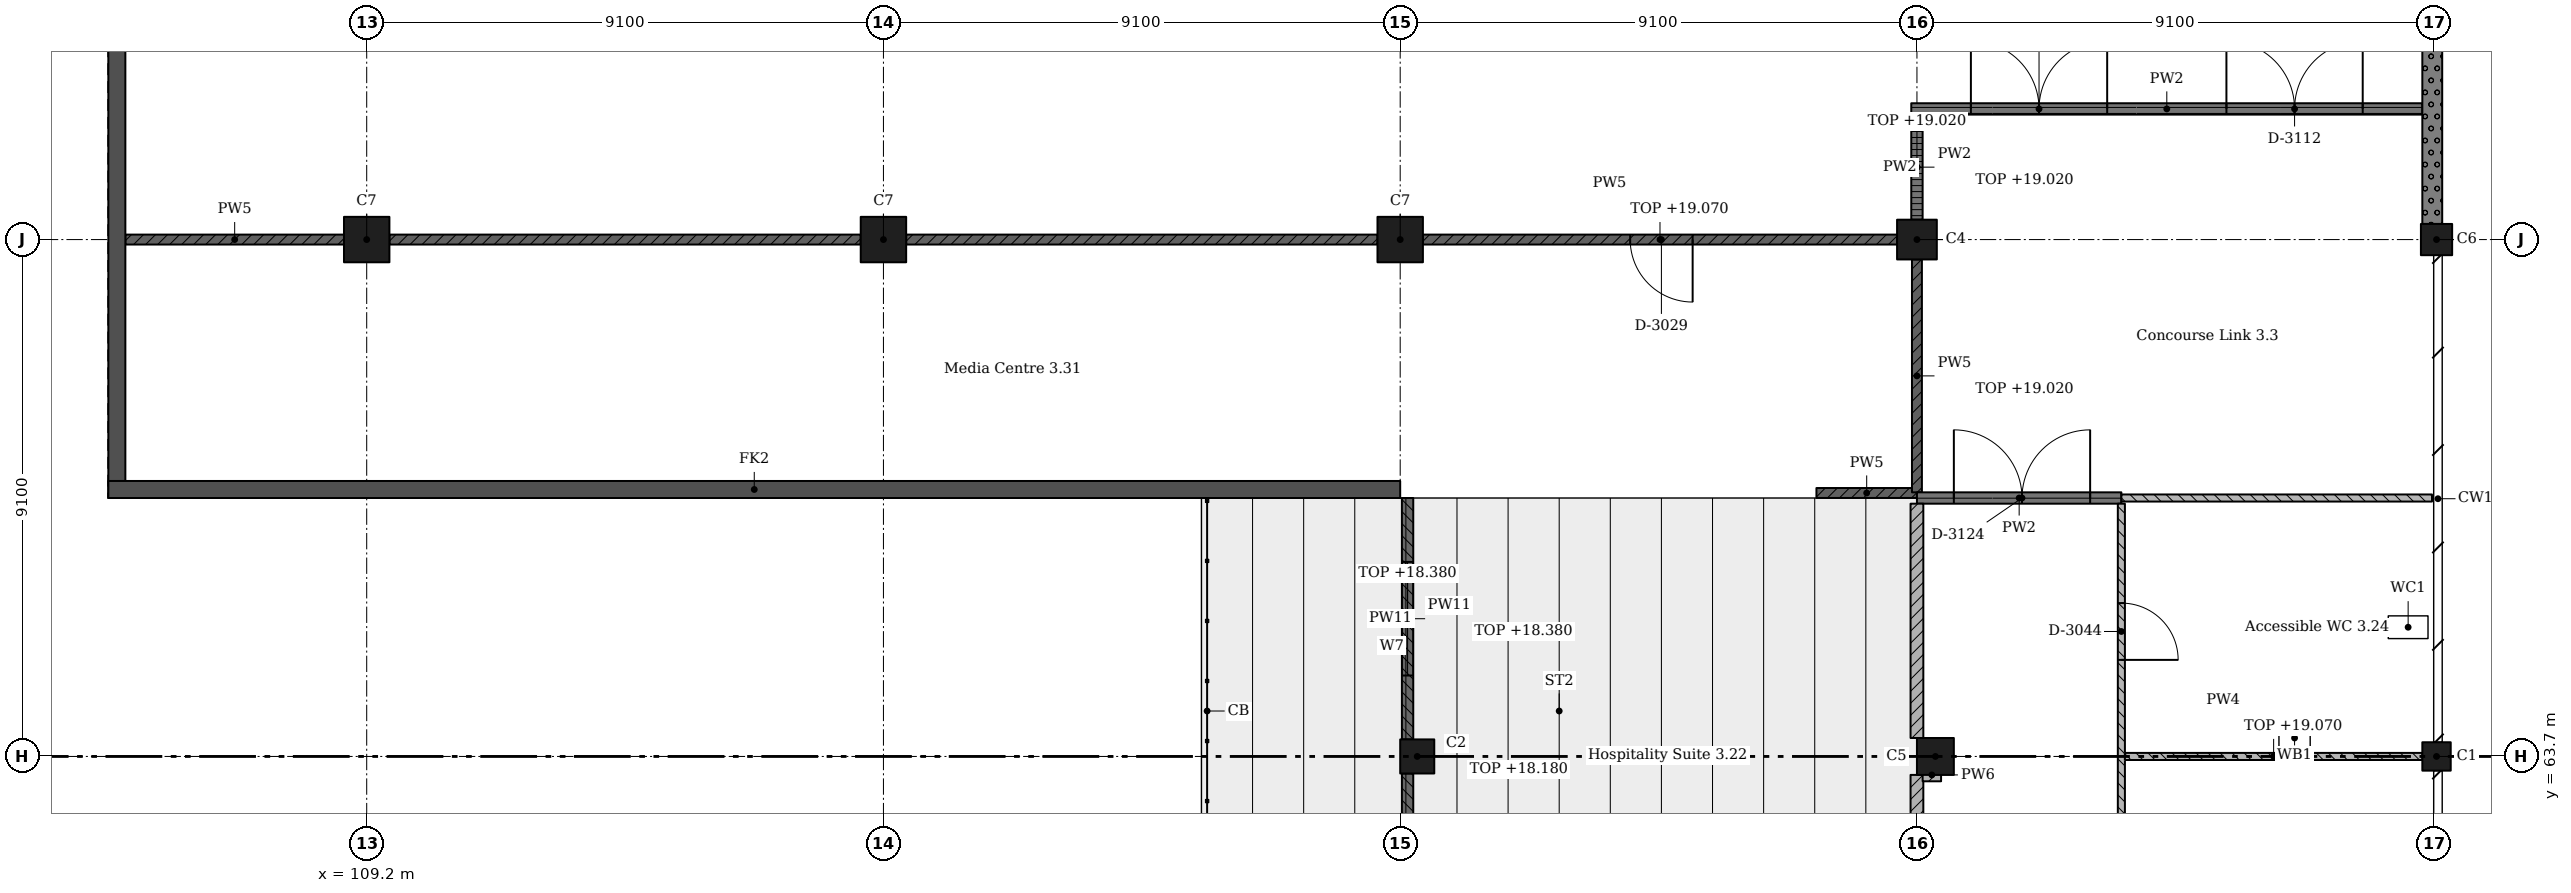
"""IFC4 building model, lengths in metres.
Left out: names, types, materials, properties, quantities, classifications, styles, units other than length and angle.
Written with IfcOpenShell. Run it as: python <this file> out.ifc"""

import sys

from ifc_helpers import new_model, si_unit, direction, frame, frame_2d, origin, origin_2d, place, context, subcontext, project, spatial, rectangle, extrude, element, fill, save


model = new_model("IFC4")
c1 = context("Model", 3, precision=1e-05, world=origin(), true_north=direction((0.0, 1.0)))
c2 = subcontext(c1, "Body", "Model", "MODEL_VIEW")
j1 = project(units=[si_unit("LENGTHUNIT", "METRE"), si_unit("PLANEANGLEUNIT", "RADIAN")], contexts=[c1])
p1 = place(None, origin())
s1 = spatial("IfcSite", under=j1, at=p1, CompositionType="ELEMENT")
p2 = place(p1, origin())
s2 = spatial("IfcBuilding", under=s1, at=p2, CompositionType="ELEMENT")
p3 = place(p2, frame((0.0, 0.0, 15.47)))
s3 = spatial("IfcBuildingStorey", under=s2, at=p3, CompositionType="ELEMENT", Elevation=15.47)
for number, where, z_axis, x_axis in (
    (1, (109.2, 72.8, 0.0), (0.0, 0.0, 1.0), (1.0, 0.0, 0.0)),
    (2, (118.3, 72.8, 0.0), (0.0, 0.0, 1.0), (1.0, 0.0, 0.0)),
):
    element("IfcColumn", number, at=place(p3, frame(where, z_axis=z_axis, x_axis=x_axis)), inside=s3, PredefinedType="COLUMN", context=c2, shape_type="SweptSolid", body=[
        extrude(rectangle(XDim=0.8, YDim=0.8, at=origin_2d()), origin(), (0.0, 0.0, 1.0), 4.55),
    ])
p4 = place(p3, frame((127.7, 63.7, 0.0), z_axis=(0.0, 0.0, 1.0), x_axis=(1.0, 0.0, 0.0)))
e3 = element("IfcColumn", 3, at=p4, inside=s3, PredefinedType="COLUMN", context=c2, shape_type="SweptSolid", body=[
    extrude(rectangle(XDim=0.6, YDim=0.6, at=origin_2d()), origin(), (0.0, 0.0, 1.0), 2.71),
])
p5 = place(p3, frame((127.4, 72.8, 0.0), z_axis=(0.0, 0.0, 1.0), x_axis=(1.0, 0.0, 0.0)))
e4 = element("IfcColumn", 4, at=p5, inside=s3, PredefinedType="COLUMN", context=c2, shape_type="SweptSolid", body=[
    extrude(rectangle(XDim=0.8, YDim=0.8, at=origin_2d()), origin(), (0.0, 0.0, 1.0), 4.55),
])
p6 = place(p3, frame((136.825, 63.7, 0.0), z_axis=(0.0, 0.0, 1.0), x_axis=(1.0, 0.0, 0.0)))
e5 = element("IfcColumn", 5, at=p6, inside=s3, PredefinedType="COLUMN", context=c2, shape_type="SweptSolid", body=[
    extrude(rectangle(XDim=0.65, YDim=0.65, at=origin_2d()), origin(), (0.0, 0.0, 1.0), 4.55),
])
p7 = place(p3, frame((136.5, 72.8, 0.0), z_axis=(0.0, 0.0, 1.0), x_axis=(1.0, 0.0, 0.0)))
e6 = element("IfcColumn", 6, at=p7, inside=s3, PredefinedType="COLUMN", context=c2, shape_type="SweptSolid", body=[
    extrude(rectangle(XDim=0.7, YDim=0.7, at=origin_2d()), origin(), (0.0, 0.0, 1.0), 4.55),
])
p8 = place(p3, frame((145.65, 63.7, 0.0), z_axis=(0.0, 0.0, 1.0), x_axis=(1.0, 0.0, 0.0)))
e7 = element("IfcColumn", 7, at=p8, inside=s3, PredefinedType="COLUMN", context=c2, shape_type="SweptSolid", body=[
    extrude(rectangle(XDim=0.5, YDim=0.5, at=origin_2d()), origin(), (0.0, 0.0, 1.0), 4.55),
])
p9 = place(p3, frame((145.65, 72.8, 0.0), z_axis=(0.0, 0.0, 1.0), x_axis=(1.0, 0.0, 0.0)))
e8 = element("IfcColumn", 8, at=p9, inside=s3, PredefinedType="COLUMN", context=c2, shape_type="SweptSolid", body=[
    extrude(rectangle(XDim=0.55, YDim=0.55, at=origin_2d()), origin(), (0.0, 0.0, 1.0), 4.55),
])
for number, where, z_axis, x_axis in (
    (9, (104.8, 68.25, 0.0), (0.0, 0.0, 1.0), (0.0, 1.0, 0.0)),
    (10, (104.65, 68.4, 0.0), (0.0, 0.0, 1.0), (1.0, 0.0, 0.0)),
):
    element("IfcWall", number, at=place(p3, frame(where, z_axis=z_axis, x_axis=x_axis)), inside=s3, PredefinedType="SHEAR", context=c2, shape_type="SweptSolid", body=[
        extrude(rectangle(XDim=22.75, YDim=0.3, at=frame_2d((11.375, 0.0))), origin(), (0.0, 0.0, 1.0), 4.55),
    ])
p10 = place(p3, frame((145.575, 73.075, 0.0), z_axis=(0.0, 0.0, 1.0), x_axis=(0.0, 1.0, 0.0)))
e11 = element("IfcWall", 11, at=p10, inside=s3, PredefinedType="SOLIDWALL", context=c2, shape_type="SweptSolid", body=[
    extrude(rectangle(XDim=8.575, YDim=0.35, at=frame_2d((4.288, 0.0))), origin(), (0.0, 0.0, 1.0), 3.55),
])
p11 = place(p3, frame((104.95, 72.8, 0.0), z_axis=(0.0, 0.0, 1.0), x_axis=(1.0, 0.0, 0.0)))
e12 = element("IfcWall", 12, at=p11, inside=s3, PredefinedType="PARTITIONING", context=c2, shape_type="SweptSolid", body=[
    extrude(rectangle(XDim=3.85, YDim=0.175, at=frame_2d((1.925, 0.0))), origin(), (0.0, 0.0, 1.0), 4.3),
])
p12 = place(p3, frame((109.6, 72.8, 0.0), z_axis=(0.0, 0.0, 1.0), x_axis=(1.0, 0.0, 0.0)))
e13 = element("IfcWall", 13, at=p12, inside=s3, PredefinedType="PARTITIONING", context=c2, shape_type="SweptSolid", body=[
    extrude(rectangle(XDim=8.3, YDim=0.175, at=frame_2d((4.15, 0.0))), origin(), (0.0, 0.0, 1.0), 3.6),
])
p13 = place(p3, frame((118.7, 72.8, 0.0), z_axis=(0.0, 0.0, 1.0), x_axis=(1.0, 0.0, 0.0)))
e14 = element("IfcWall", 14, at=p13, inside=s3, PredefinedType="PARTITIONING", context=c2, shape_type="SweptSolid", body=[
    extrude(rectangle(XDim=8.3, YDim=0.175, at=frame_2d((4.15, 0.0))), origin(), (0.0, 0.0, 1.0), 3.6),
])
p14 = place(p3, frame((127.8, 72.8, 0.0), z_axis=(0.0, 0.0, 1.0), x_axis=(1.0, 0.0, 0.0)))
e15 = element("IfcWall", 15, at=p14, inside=s3, PredefinedType="PARTITIONING", context=c2, shape_type="SweptSolid", body=[
    extrude(rectangle(XDim=8.35, YDim=0.175, at=frame_2d((4.175, 0.0))), origin(), (0.0, 0.0, 1.0), 3.6),
])
p15 = place(p14, frame((3.65, 0.0, 0.0)))
e16 = element("IfcOpeningElement", 16, at=p15, cuts=e15, PredefinedType="OPENING", context=c2, shape_type="SweptSolid", body=[
    extrude(rectangle(XDim=1.1, YDim=2.4, at=frame_2d((0.55, 1.2))), frame((0.0, 0.097, 0.0), z_axis=(0.0, -1.0, 0.0), x_axis=(1.0, 0.0, 0.0)), (0.0, 0.0, 1.0), 0.195),
])
p16 = place(p3, frame((136.5, 54.925, 0.0), z_axis=(0.0, 0.0, 1.0), x_axis=(0.0, 1.0, 0.0)))
e17 = element("IfcWall", 17, at=p16, inside=s3, PredefinedType="PARTITIONING", context=c2, shape_type="SweptSolid", body=[
    extrude(rectangle(XDim=8.45, YDim=0.225, at=frame_2d((4.225, 0.0))), origin(), (0.0, 0.0, 1.0), 3.55),
])
p17 = place(p16, frame((3.75, 0.0, 0.0)))
e18 = element("IfcOpeningElement", 18, at=p17, cuts=e17, PredefinedType="OPENING", context=c2, shape_type="SweptSolid", body=[
    extrude(rectangle(XDim=1.0, YDim=2.4, at=frame_2d((0.5, 1.2))), frame((0.0, 0.123, 0.0), z_axis=(0.0, -1.0, 0.0), x_axis=(1.0, 0.0, 0.0)), (0.0, 0.0, 1.0), 0.245),
])
p18 = place(p3, frame((136.5, 64.025, 0.0), z_axis=(0.0, 0.0, 1.0), x_axis=(0.0, 1.0, 0.0)))
e19 = element("IfcWall", 19, at=p18, inside=s3, PredefinedType="PARTITIONING", context=c2, shape_type="SweptSolid", body=[
    extrude(rectangle(XDim=4.125, YDim=0.225, at=frame_2d((2.062, 0.0))), origin(), (0.0, 0.0, 1.0), 3.55),
])
p19 = place(p3, frame((136.5, 68.338, 0.0), z_axis=(0.0, 0.0, 1.0), x_axis=(-1.0, 0.0, 0.0)))
e20 = element("IfcWall", 20, at=p19, inside=s3, PredefinedType="PARTITIONING", context=c2, shape_type="SweptSolid", body=[
    extrude(rectangle(XDim=1.77, YDim=0.175, at=frame_2d((0.885, 0.0))), origin(), (0.0, 0.0, 1.0), 4.3),
])
p20 = place(p3, frame((136.5, 72.45, 0.0), z_axis=(0.0, 0.0, 1.0), x_axis=(0.0, -1.0, 0.0)))
e21 = element("IfcWall", 21, at=p20, inside=s3, PredefinedType="PARTITIONING", context=c2, shape_type="SweptSolid", body=[
    extrude(rectangle(XDim=4.1, YDim=0.175, at=frame_2d((2.05, 0.0))), origin(), (0.0, 0.0, 1.0), 3.55),
])
p21 = place(p3, frame((136.5, 75.0, 0.0), z_axis=(0.0, 0.0, 1.0), x_axis=(0.0, -1.0, 0.0)))
e22 = element("IfcWall", 22, at=p21, inside=s3, PredefinedType="PARTITIONING", context=c2, shape_type="SweptSolid", body=[
    extrude(rectangle(XDim=1.85, YDim=0.2, at=frame_2d((0.925, 0.0))), origin(), (0.0, 0.0, 1.0), 3.55),
])
p22 = place(p3, frame((136.6, 63.375, 0.0), z_axis=(0.0, 0.0, 1.0), x_axis=(1.0, 0.0, 0.0)))
e23 = element("IfcWall", 23, at=p22, inside=s3, PredefinedType="PARTITIONING", context=c2, shape_type="SweptSolid", body=[
    extrude(rectangle(XDim=0.325, YDim=0.225, at=frame_2d((0.163, 0.0))), origin(), (0.0, 0.0, 1.0), 4.3),
])
p23 = place(p3, frame((140.1, 54.6, 0.0), z_axis=(0.0, 0.0, 1.0), x_axis=(0.0, 1.0, 0.0)))
e24 = element("IfcWall", 24, at=p23, inside=s3, PredefinedType="PARTITIONING", context=c2, shape_type="SweptSolid", body=[
    extrude(rectangle(XDim=13.55, YDim=0.125, at=frame_2d((6.775, 0.0))), origin(), (0.0, 0.0, 1.0), 4.3),
])
p24 = place(p23, frame((4.05, 0.0, 0.0)))
e25 = element("IfcOpeningElement", 25, at=p24, cuts=e24, PredefinedType="OPENING", context=c2, shape_type="SweptSolid", body=[
    extrude(rectangle(XDim=1.0, YDim=2.1, at=frame_2d((0.5, 1.05))), frame((0.0, 0.073, 0.0), z_axis=(0.0, -1.0, 0.0), x_axis=(1.0, 0.0, 0.0)), (0.0, 0.0, 1.0), 0.145),
])
p25 = place(p23, frame((10.8, 0.0, 0.0)))
e26 = element("IfcOpeningElement", 26, at=p25, cuts=e24, PredefinedType="OPENING", context=c2, shape_type="SweptSolid", body=[
    extrude(rectangle(XDim=1.0, YDim=2.1, at=frame_2d((0.5, 1.05))), frame((0.0, 0.073, 0.0), z_axis=(0.0, -1.0, 0.0), x_axis=(1.0, 0.0, 0.0)), (0.0, 0.0, 1.0), 0.145),
])
p26 = place(p3, frame((140.1, 68.25, 0.0), z_axis=(0.0, 0.0, 1.0), x_axis=(-1.0, 0.0, 0.0)))
e27 = element("IfcWall", 27, at=p26, inside=s3, PredefinedType="PARTITIONING", context=c2, shape_type="SweptSolid", body=[
    extrude(rectangle(XDim=3.6, YDim=0.2, at=frame_2d((1.8, 0.0))), origin(), (0.0, 0.0, 1.0), 4.3),
])
p27 = place(p26, frame((0.55, 0.0, 0.0)))
e28 = element("IfcOpeningElement", 28, at=p27, cuts=e27, PredefinedType="OPENING", context=c2, shape_type="SweptSolid", body=[
    extrude(rectangle(XDim=2.4, YDim=2.4, at=frame_2d((1.2, 1.2))), frame((0.0, 0.11, 0.0), z_axis=(0.0, -1.0, 0.0), x_axis=(1.0, 0.0, 0.0)), (0.0, 0.0, 1.0), 0.22),
])
p28 = place(p3, frame((140.163, 63.7, 0.0), z_axis=(0.0, 0.0, 1.0), x_axis=(1.0, 0.0, 0.0)))
e29 = element("IfcWall", 29, at=p28, inside=s3, PredefinedType="PARTITIONING", context=c2, shape_type="SweptSolid", body=[
    extrude(rectangle(XDim=5.237, YDim=0.125, at=frame_2d((2.619, 0.0))), origin(), (0.0, 0.0, 1.0), 3.6),
])
p29 = place(p3, frame((145.4, 75.1, 0.0), z_axis=(0.0, 0.0, 1.0), x_axis=(-1.0, 0.0, 0.0)))
e30 = element("IfcWall", 30, at=p29, inside=s3, PredefinedType="PARTITIONING", context=c2, shape_type="SweptSolid", body=[
    extrude(rectangle(XDim=9.0, YDim=0.2, at=frame_2d((4.5, 0.0))), origin(), (0.0, 0.0, 1.0), 4.3),
])
p30 = place(p29, frame((1.05, 0.0, 0.0)))
e31 = element("IfcOpeningElement", 31, at=p30, cuts=e30, PredefinedType="OPENING", context=c2, shape_type="SweptSolid", body=[
    extrude(rectangle(XDim=2.4, YDim=2.4, at=frame_2d((1.2, 1.2))), frame((0.0, 0.11, 0.0), z_axis=(0.0, -1.0, 0.0), x_axis=(1.0, 0.0, 0.0)), (0.0, 0.0, 1.0), 0.22),
])
p31 = place(p29, frame((5.55, 0.0, 0.0)))
e32 = element("IfcOpeningElement", 32, at=p31, cuts=e30, PredefinedType="OPENING", context=c2, shape_type="SweptSolid", body=[
    extrude(rectangle(XDim=2.4, YDim=2.4, at=frame_2d((1.2, 1.2))), frame((0.0, 0.11, 0.0), z_axis=(0.0, -1.0, 0.0), x_axis=(1.0, 0.0, 0.0)), (0.0, 0.0, 1.0), 0.22),
])
p32 = place(p3, frame((145.57, 68.25, 0.0), z_axis=(0.0, 0.0, 1.0), x_axis=(-1.0, 0.0, 0.0)))
e33 = element("IfcWall", 33, at=p32, inside=s3, PredefinedType="PARTITIONING", context=c2, shape_type="SweptSolid", body=[
    extrude(rectangle(XDim=5.47, YDim=0.125, at=frame_2d((2.735, 0.0))), origin(), (0.0, 0.0, 1.0), 4.3),
])
p33 = place(p3, frame((127.53, 54.9, 0.0), z_axis=(0.0, 0.0, 1.0), x_axis=(0.0, 1.0, 0.0)))
e34 = element("IfcWall", 34, at=p33, inside=s3, PredefinedType="PARTITIONING", context=c2, shape_type="SweptSolid", body=[
    extrude(rectangle(XDim=8.5, YDim=0.2, at=frame_2d((4.25, 0.0))), origin(), (0.0, 0.0, 1.0), 2.71),
])
p34 = place(p33, frame((1.25, 0.0, 1.1)))
e35 = element("IfcOpeningElement", 35, at=p34, cuts=e34, PredefinedType="OPENING", context=c2, shape_type="SweptSolid", body=[
    extrude(rectangle(XDim=6.0, YDim=1.3, at=frame_2d((3.0, 0.65))), frame((0.0, 0.11, 0.0), z_axis=(0.0, -1.0, 0.0), x_axis=(1.0, 0.0, 0.0)), (0.0, 0.0, 1.0), 0.22),
])
p35 = place(p3, frame((127.53, 64.0, 0.0), z_axis=(0.0, 0.0, 1.0), x_axis=(0.0, 1.0, 0.0)))
e36 = element("IfcWall", 36, at=p35, inside=s3, PredefinedType="PARTITIONING", context=c2, shape_type="SweptSolid", body=[
    extrude(rectangle(XDim=4.25, YDim=0.2, at=frame_2d((2.125, 0.0))), origin(), (0.0, 0.0, 1.0), 2.91),
])
p36 = place(p35, frame((1.125, 0.0, 1.1)))
e37 = element("IfcOpeningElement", 37, at=p36, cuts=e36, PredefinedType="OPENING", context=c2, shape_type="SweptSolid", body=[
    extrude(rectangle(XDim=2.0, YDim=1.3, at=frame_2d((1.0, 0.65))), frame((0.0, 0.11, 0.0), z_axis=(0.0, -1.0, 0.0), x_axis=(1.0, 0.0, 0.0)), (0.0, 0.0, 1.0), 0.22),
])
p37 = place(p36, origin())
e38 = element("IfcWindow", 38, at=p37, inside=s3, PartitioningType="SINGLE_PANEL", PredefinedType="WINDOW", context=c2, shape_type="SweptSolid", body=[
    extrude(rectangle(XDim=2.0, YDim=1.3, at=frame_2d((1.0, 0.65))), frame((0.0, 0.03, 0.0), z_axis=(0.0, -1.0, 0.0), x_axis=(1.0, 0.0, 0.0)), (0.0, 0.0, 1.0), 0.06),
])
fill(e37, e38)
p38 = place(p15, origin())
e39 = element("IfcDoor", 39, at=p38, inside=s3, OperationType="SINGLE_SWING_RIGHT", PredefinedType="DOOR", context=c2, shape_type="SweptSolid", body=[
    extrude(rectangle(XDim=1.1, YDim=2.4, at=frame_2d((0.55, 1.2))), frame((0.0, 0.025, 0.0), z_axis=(0.0, -1.0, 0.0), x_axis=(1.0, 0.0, 0.0)), (0.0, 0.0, 1.0), 0.05),
])
fill(e16, e39)
p39 = place(p25, origin())
e40 = element("IfcDoor", 40, at=p39, inside=s3, OperationType="SINGLE_SWING_LEFT", PredefinedType="DOOR", context=c2, shape_type="SweptSolid", body=[
    extrude(rectangle(XDim=1.0, YDim=2.1, at=frame_2d((0.5, 1.05))), frame((0.0, 0.025, 0.0), z_axis=(0.0, -1.0, 0.0), x_axis=(1.0, 0.0, 0.0)), (0.0, 0.0, 1.0), 0.05),
])
fill(e26, e40)
p40 = place(p30, origin())
e41 = element("IfcDoor", 41, at=p40, inside=s3, OperationType="DOUBLE_DOOR_SINGLE_SWING", PredefinedType="DOOR", context=c2, shape_type="SweptSolid", body=[
    extrude(rectangle(XDim=2.4, YDim=2.4, at=frame_2d((1.2, 1.2))), frame((0.0, 0.025, 0.0), z_axis=(0.0, -1.0, 0.0), x_axis=(1.0, 0.0, 0.0)), (0.0, 0.0, 1.0), 0.05),
])
fill(e31, e41)
p41 = place(p31, origin())
e42 = element("IfcDoor", 42, at=p41, inside=s3, OperationType="DOUBLE_DOOR_SINGLE_SWING", PredefinedType="DOOR", context=c2, shape_type="SweptSolid", body=[
    extrude(rectangle(XDim=2.4, YDim=2.4, at=frame_2d((1.2, 1.2))), frame((0.0, 0.025, 0.0), z_axis=(0.0, -1.0, 0.0), x_axis=(1.0, 0.0, 0.0)), (0.0, 0.0, 1.0), 0.05),
])
fill(e32, e42)
p42 = place(p27, origin())
e43 = element("IfcDoor", 43, at=p42, inside=s3, OperationType="DOUBLE_DOOR_SINGLE_SWING", PredefinedType="DOOR", context=c2, shape_type="SweptSolid", body=[
    extrude(rectangle(XDim=2.4, YDim=2.4, at=frame_2d((1.2, 1.2))), frame((0.0, 0.025, 0.0), z_axis=(0.0, -1.0, 0.0), x_axis=(1.0, 0.0, 0.0)), (0.0, 0.0, 1.0), 0.05),
])
fill(e28, e43)
save(model, sys.argv[1])
